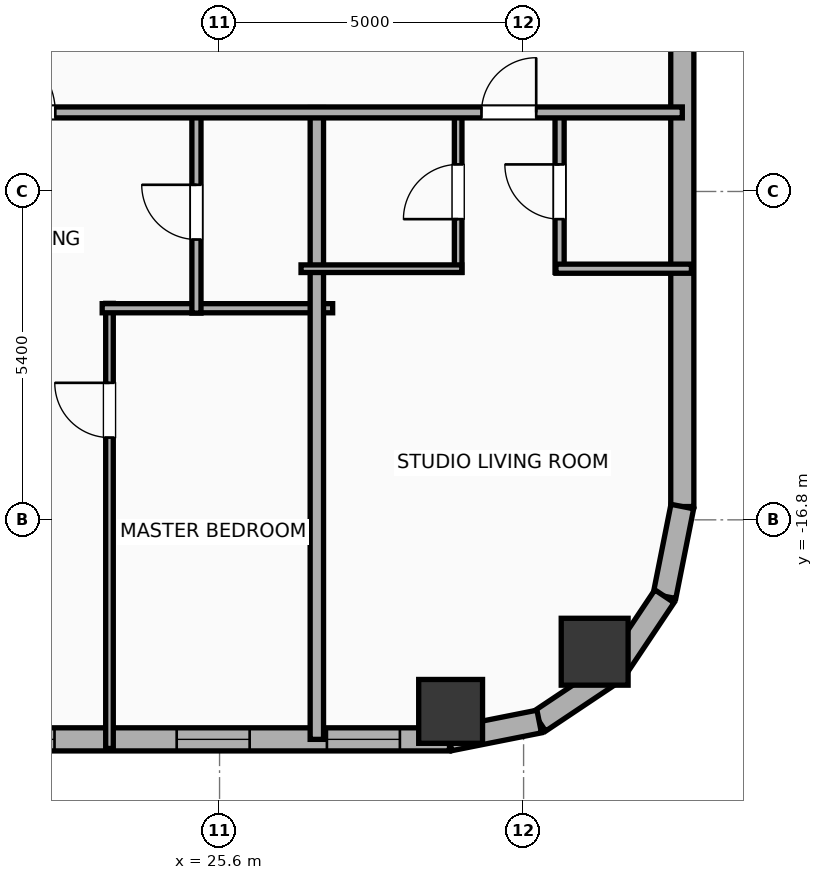
"""IFC4 building model, lengths in metres.
Left out: names, types, materials, properties, quantities, classifications, styles, units other than length and angle.
Written with IfcOpenShell. Run it as: python <this file> out.ifc"""

import sys

from ifc_helpers import new_model, si_unit, direction, frame, frame_2d, origin, origin_2d, place, context, subcontext, project, spatial, rectangle, hollow_rectangle, hollow_circle, extrude, element, fill, save


model = new_model("IFC4")
c1 = context("Model", 3, precision=1e-05, world=origin(), true_north=direction((0.0, 1.0)))
c2 = subcontext(c1, "Body", "Model", "MODEL_VIEW")
j1 = project(units=[si_unit("LENGTHUNIT", "METRE"), si_unit("PLANEANGLEUNIT", "RADIAN")], contexts=[c1])
p1 = place(None, origin())
s1 = spatial("IfcSite", under=j1, at=p1, CompositionType="ELEMENT")
p2 = place(p1, origin())
s2 = spatial("IfcBuilding", under=s1, at=p2, CompositionType="ELEMENT")
p3 = place(p2, frame((0.0, 0.0, 97.5)))
s3 = spatial("IfcBuildingStorey", under=s2, at=p3, CompositionType="ELEMENT", Elevation=97.5)
p4 = place(p3, frame((29.4, -19.95, 0.0), z_axis=(0.0, 0.0, 1.0), x_axis=(1.0, 0.0, 0.0)))
e1 = element("IfcColumn", 1, at=p4, inside=s3, PredefinedType="COLUMN", context=c2, shape_type="SweptSolid", body=[
    extrude(hollow_rectangle(XDim=1.05, YDim=1.05, WallThickness=0.036, at=origin_2d()), origin(), (0.0, 0.0, 1.0), 3.9),
])
p5 = place(p3, frame((31.769, -18.969, 0.0), z_axis=(0.0, 0.0, 1.0), x_axis=(1.0, 0.0, 0.0)))
e2 = element("IfcColumn", 2, at=p5, inside=s3, PredefinedType="COLUMN", context=c2, shape_type="SweptSolid", body=[
    extrude(hollow_circle(Radius=0.55, WallThickness=0.036, at=origin_2d()), origin(), (0.0, 0.0, 1.0), 3.9),
])
p6 = place(p3, frame((29.381, -20.41, 0.0), z_axis=(0.0, 0.0, 1.0), x_axis=(-1.0, 0.0, 0.0)))
e3 = element("IfcWall", 3, at=p6, inside=s3, PredefinedType="ELEMENTEDWALL", context=c2, shape_type="SweptSolid", body=[
    extrude(rectangle(XDim=54.763, YDim=0.38, at=frame_2d((27.381, 0.0))), origin(), (0.0, 0.0, 1.0), 3.65),
])
p7 = place(p6, frame((6.495, 0.0, 0.75)))
e4 = element("IfcOpeningElement", 4, at=p7, cuts=e3, PredefinedType="OPENING", context=c2, shape_type="SweptSolid", body=[
    extrude(rectangle(XDim=2.4, YDim=2.1, at=frame_2d((1.2, 1.05))), frame((0.0, 0.2, 0.0), z_axis=(0.0, -1.0, 0.0), x_axis=(1.0, 0.0, 0.0)), (0.0, 0.0, 1.0), 0.4),
])
p8 = place(p6, frame((17.686, 0.0, 0.75)))
e5 = element("IfcOpeningElement", 5, at=p8, cuts=e3, PredefinedType="OPENING", context=c2, shape_type="SweptSolid", body=[
    extrude(rectangle(XDim=2.4, YDim=2.1, at=frame_2d((1.2, 1.05))), frame((0.0, 0.2, 0.0), z_axis=(0.0, -1.0, 0.0), x_axis=(1.0, 0.0, 0.0)), (0.0, 0.0, 1.0), 0.4),
])
p9 = place(p6, frame((34.677, 0.0, 0.75)))
e6 = element("IfcOpeningElement", 6, at=p9, cuts=e3, PredefinedType="OPENING", context=c2, shape_type="SweptSolid", body=[
    extrude(rectangle(XDim=2.4, YDim=2.1, at=frame_2d((1.2, 1.05))), frame((0.0, 0.2, 0.0), z_axis=(0.0, -1.0, 0.0), x_axis=(1.0, 0.0, 0.0)), (0.0, 0.0, 1.0), 0.4),
])
p10 = place(p6, frame((45.867, 0.0, 0.75)))
e7 = element("IfcOpeningElement", 7, at=p10, cuts=e3, PredefinedType="OPENING", context=c2, shape_type="SweptSolid", body=[
    extrude(rectangle(XDim=2.4, YDim=2.1, at=frame_2d((1.2, 1.05))), frame((0.0, 0.2, 0.0), z_axis=(0.0, -1.0, 0.0), x_axis=(1.0, 0.0, 0.0)), (0.0, 0.0, 1.0), 0.4),
])
p11 = place(p6, frame((52.281, 0.0, 0.75)))
e8 = element("IfcOpeningElement", 8, at=p11, cuts=e3, PredefinedType="OPENING", context=c2, shape_type="SweptSolid", body=[
    extrude(rectangle(XDim=1.2, YDim=2.05, at=frame_2d((0.6, 1.025))), frame((0.0, 0.2, 0.0), z_axis=(0.0, -1.0, 0.0), x_axis=(1.0, 0.0, 0.0)), (0.0, 0.0, 1.0), 0.4),
])
p12 = place(p6, frame((49.641, 0.0, 0.75)))
e9 = element("IfcOpeningElement", 9, at=p12, cuts=e3, PredefinedType="OPENING", context=c2, shape_type="SweptSolid", body=[
    extrude(rectangle(XDim=1.2, YDim=2.05, at=frame_2d((0.6, 1.025))), frame((0.0, 0.2, 0.0), z_axis=(0.0, -1.0, 0.0), x_axis=(1.0, 0.0, 0.0)), (0.0, 0.0, 1.0), 0.4),
])
p13 = place(p6, frame((39.543, 0.0, 0.75)))
e10 = element("IfcOpeningElement", 10, at=p13, cuts=e3, PredefinedType="OPENING", context=c2, shape_type="SweptSolid", body=[
    extrude(rectangle(XDim=1.2, YDim=2.05, at=frame_2d((0.6, 1.025))), frame((0.0, 0.2, 0.0), z_axis=(0.0, -1.0, 0.0), x_axis=(1.0, 0.0, 0.0)), (0.0, 0.0, 1.0), 0.4),
])
p14 = place(p6, frame((44.538, 0.0, 0.75)))
e11 = element("IfcOpeningElement", 11, at=p14, cuts=e3, PredefinedType="OPENING", context=c2, shape_type="SweptSolid", body=[
    extrude(rectangle(XDim=0.52, YDim=2.05, at=frame_2d((0.26, 1.025))), frame((0.0, 0.2, 0.0), z_axis=(0.0, -1.0, 0.0), x_axis=(1.0, 0.0, 0.0)), (0.0, 0.0, 1.0), 0.4),
])
p15 = place(p6, frame((28.206, 0.0, 0.75)))
e12 = element("IfcOpeningElement", 12, at=p15, cuts=e3, PredefinedType="OPENING", context=c2, shape_type="SweptSolid", body=[
    extrude(rectangle(XDim=1.2, YDim=2.05, at=frame_2d((0.6, 1.025))), frame((0.0, 0.2, 0.0), z_axis=(0.0, -1.0, 0.0), x_axis=(1.0, 0.0, 0.0)), (0.0, 0.0, 1.0), 0.4),
])
p16 = place(p6, frame((31.241, 0.0, 0.75)))
e13 = element("IfcOpeningElement", 13, at=p16, cuts=e3, PredefinedType="OPENING", context=c2, shape_type="SweptSolid", body=[
    extrude(rectangle(XDim=0.85, YDim=2.05, at=frame_2d((0.425, 1.025))), frame((0.0, 0.2, 0.0), z_axis=(0.0, -1.0, 0.0), x_axis=(1.0, 0.0, 0.0)), (0.0, 0.0, 1.0), 0.4),
])
p17 = place(p6, frame((24.561, 0.0, 0.75)))
e14 = element("IfcOpeningElement", 14, at=p17, cuts=e3, PredefinedType="OPENING", context=c2, shape_type="SweptSolid", body=[
    extrude(rectangle(XDim=1.2, YDim=2.05, at=frame_2d((0.6, 1.025))), frame((0.0, 0.2, 0.0), z_axis=(0.0, -1.0, 0.0), x_axis=(1.0, 0.0, 0.0)), (0.0, 0.0, 1.0), 0.4),
])
p18 = place(p6, frame((22.561, 0.0, 0.75)))
e15 = element("IfcOpeningElement", 15, at=p18, cuts=e3, PredefinedType="OPENING", context=c2, shape_type="SweptSolid", body=[
    extrude(rectangle(XDim=0.52, YDim=2.05, at=frame_2d((0.26, 1.025))), frame((0.0, 0.2, 0.0), z_axis=(0.0, -1.0, 0.0), x_axis=(1.0, 0.0, 0.0)), (0.0, 0.0, 1.0), 0.4),
])
p19 = place(p6, frame((13.886, 0.0, 0.75)))
e16 = element("IfcOpeningElement", 16, at=p19, cuts=e3, PredefinedType="OPENING", context=c2, shape_type="SweptSolid", body=[
    extrude(rectangle(XDim=1.2, YDim=2.05, at=frame_2d((0.6, 1.025))), frame((0.0, 0.2, 0.0), z_axis=(0.0, -1.0, 0.0), x_axis=(1.0, 0.0, 0.0)), (0.0, 0.0, 1.0), 0.4),
])
p20 = place(p6, frame((11.694, 0.0, 0.75)))
e17 = element("IfcOpeningElement", 17, at=p20, cuts=e3, PredefinedType="OPENING", context=c2, shape_type="SweptSolid", body=[
    extrude(rectangle(XDim=0.85, YDim=2.05, at=frame_2d((0.425, 1.025))), frame((0.0, 0.2, 0.0), z_axis=(0.0, -1.0, 0.0), x_axis=(1.0, 0.0, 0.0)), (0.0, 0.0, 1.0), 0.4),
])
p21 = place(p6, frame((3.286, 0.0, 0.75)))
e18 = element("IfcOpeningElement", 18, at=p21, cuts=e3, PredefinedType="OPENING", context=c2, shape_type="SweptSolid", body=[
    extrude(rectangle(XDim=1.2, YDim=2.05, at=frame_2d((0.6, 1.025))), frame((0.0, 0.2, 0.0), z_axis=(0.0, -1.0, 0.0), x_axis=(1.0, 0.0, 0.0)), (0.0, 0.0, 1.0), 0.4),
])
p22 = place(p6, frame((0.816, 0.0, 0.75)))
e19 = element("IfcOpeningElement", 19, at=p22, cuts=e3, PredefinedType="OPENING", context=c2, shape_type="SweptSolid", body=[
    extrude(rectangle(XDim=1.2, YDim=2.05, at=frame_2d((0.6, 1.025))), frame((0.0, 0.2, 0.0), z_axis=(0.0, -1.0, 0.0), x_axis=(1.0, 0.0, 0.0)), (0.0, 0.0, 1.0), 0.4),
])
p23 = place(p3, frame((33.21, 17.781, 0.0), z_axis=(0.0, 0.0, 1.0), x_axis=(0.0, -1.0, 0.0)))
e20 = element("IfcWall", 20, at=p23, inside=s3, PredefinedType="ELEMENTEDWALL", context=c2, shape_type="SweptSolid", body=[
    extrude(rectangle(XDim=34.363, YDim=0.38, at=frame_2d((17.181, 0.0))), origin(), (0.0, 0.0, 1.0), 3.65),
])
p24 = place(p23, frame((12.836, 0.0, 0.75)))
e21 = element("IfcOpeningElement", 21, at=p24, cuts=e20, PredefinedType="OPENING", context=c2, shape_type="SweptSolid", body=[
    extrude(rectangle(XDim=1.2, YDim=2.05, at=frame_2d((0.6, 1.025))), frame((0.0, 0.2, 0.0), z_axis=(0.0, -1.0, 0.0), x_axis=(1.0, 0.0, 0.0)), (0.0, 0.0, 1.0), 0.4),
])
p25 = place(p23, frame((21.386, 0.0, 0.75)))
e22 = element("IfcOpeningElement", 22, at=p25, cuts=e20, PredefinedType="OPENING", context=c2, shape_type="SweptSolid", body=[
    extrude(rectangle(XDim=1.2, YDim=2.05, at=frame_2d((0.6, 1.025))), frame((0.0, 0.2, 0.0), z_axis=(0.0, -1.0, 0.0), x_axis=(1.0, 0.0, 0.0)), (0.0, 0.0, 1.0), 0.4),
])
p26 = place(p3, frame((33.21, -16.581, 0.0), z_axis=(0.0, 0.0, 1.0), x_axis=(-0.195086038585, -0.980786132421, 0.0)))
e23 = element("IfcWall", 23, at=p26, inside=s3, PredefinedType="ELEMENTEDWALL", context=c2, shape_type="SweptSolid", body=[
    extrude(rectangle(XDim=1.504, YDim=0.38, at=frame_2d((0.752, 0.0))), origin(), (0.0, 0.0, 1.0), 3.65),
])
p27 = place(p3, frame((32.917, -18.057, 0.0), z_axis=(0.0, 0.0, 1.0), x_axis=(-0.555610286119, -0.831442848281, 0.0)))
e24 = element("IfcWall", 24, at=p27, inside=s3, PredefinedType="ELEMENTEDWALL", context=c2, shape_type="SweptSolid", body=[
    extrude(rectangle(XDim=1.485, YDim=0.38, at=frame_2d((0.743, 0.0))), origin(), (0.0, 0.0, 1.0), 3.65),
])
p28 = place(p3, frame((32.091, -19.292, 0.0), z_axis=(0.0, 0.0, 1.0), x_axis=(-0.831468045563, -0.555572577804, 0.0)))
e25 = element("IfcWall", 25, at=p28, inside=s3, PredefinedType="ELEMENTEDWALL", context=c2, shape_type="SweptSolid", body=[
    extrude(rectangle(XDim=1.485, YDim=0.38, at=frame_2d((0.742, 0.0))), origin(), (0.0, 0.0, 1.0), 3.65),
])
p29 = place(p3, frame((30.857, -20.116, 0.0), z_axis=(0.0, 0.0, 1.0), x_axis=(-0.980786132421, -0.195086038585, 0.0)))
e26 = element("IfcWall", 26, at=p29, inside=s3, PredefinedType="ELEMENTEDWALL", context=c2, shape_type="SweptSolid", body=[
    extrude(rectangle(XDim=1.504, YDim=0.38, at=frame_2d((0.752, 0.0))), origin(), (0.0, 0.0, 1.0), 3.65),
])
p30 = place(p3, frame((23.79, -20.56, 0.0), z_axis=(0.0, 0.0, 1.0), x_axis=(0.0, 1.0, 0.0)))
e27 = element("IfcWall", 27, at=p30, inside=s3, PredefinedType="PARTITIONING", context=c2, shape_type="SweptSolid", body=[
    extrude(rectangle(XDim=7.32, YDim=0.125, at=frame_2d((3.66, 0.0))), origin(), (0.0, 0.0, 1.0), 3.65),
])
p31 = place(p30, frame((5.113, 0.0, 0.0)))
e28 = element("IfcOpeningElement", 28, at=p31, cuts=e27, PredefinedType="OPENING", context=c2, shape_type="SweptSolid", body=[
    extrude(rectangle(XDim=0.9, YDim=2.05, at=frame_2d((0.45, 1.025))), frame((0.0, 0.073, 0.0), z_axis=(0.0, -1.0, 0.0), x_axis=(1.0, 0.0, 0.0)), (0.0, 0.0, 1.0), 0.145),
])
p32 = place(p3, frame((23.67, -13.32, 0.0), z_axis=(0.0, 0.0, 1.0), x_axis=(1.0, 0.0, 0.0)))
e29 = element("IfcWall", 29, at=p32, inside=s3, PredefinedType="PLUMBINGWALL", context=c2, shape_type="SweptSolid", body=[
    extrude(rectangle(XDim=3.79, YDim=0.15, at=frame_2d((1.895, 0.0))), origin(), (0.0, 0.0, 1.0), 3.65),
])
p33 = place(p3, frame((25.22, -13.4, 0.0), z_axis=(0.0, 0.0, 1.0), x_axis=(0.0, 1.0, 0.0)))
e30 = element("IfcWall", 30, at=p33, inside=s3, PredefinedType="PLUMBINGWALL", context=c2, shape_type="SweptSolid", body=[
    extrude(rectangle(XDim=3.32, YDim=0.15, at=frame_2d((1.66, 0.0))), origin(), (0.0, 0.0, 1.0), 3.65),
])
p34 = place(p33, frame((1.21, 0.0, 0.0)))
e31 = element("IfcOpeningElement", 31, at=p34, cuts=e30, PredefinedType="OPENING", context=c2, shape_type="SweptSolid", body=[
    extrude(rectangle(XDim=0.9, YDim=2.05, at=frame_2d((0.45, 1.025))), frame((0.0, 0.085, 0.0), z_axis=(0.0, -1.0, 0.0), x_axis=(1.0, 0.0, 0.0)), (0.0, 0.0, 1.0), 0.17),
])
p35 = place(p3, frame((27.2, -20.41, 0.0), z_axis=(0.0, 0.0, 1.0), x_axis=(0.0, 1.0, 0.0)))
e32 = element("IfcWall", 32, at=p35, inside=s3, PredefinedType="PARTITIONING", context=c2, shape_type="SweptSolid", body=[
    extrude(rectangle(XDim=10.39, YDim=0.22, at=frame_2d((5.195, 0.0))), origin(), (0.0, 0.0, 1.0), 3.65),
])
p36 = place(p3, frame((29.524, -12.73, 0.0), z_axis=(0.0, 0.0, 1.0), x_axis=(0.0, 1.0, 0.0)))
e33 = element("IfcWall", 33, at=p36, inside=s3, PredefinedType="PARTITIONING", context=c2, shape_type="SweptSolid", body=[
    extrude(rectangle(XDim=2.65, YDim=0.125, at=frame_2d((1.325, 0.0))), origin(), (0.0, 0.0, 1.0), 3.65),
])
p37 = place(p36, frame((0.875, 0.0, 0.0)))
e34 = element("IfcOpeningElement", 34, at=p37, cuts=e33, PredefinedType="OPENING", context=c2, shape_type="SweptSolid", body=[
    extrude(rectangle(XDim=0.9, YDim=2.05, at=frame_2d((0.45, 1.025))), frame((0.0, 0.073, 0.0), z_axis=(0.0, -1.0, 0.0), x_axis=(1.0, 0.0, 0.0)), (0.0, 0.0, 1.0), 0.145),
])
p38 = place(p3, frame((31.192, -12.73, 0.0), z_axis=(0.0, 0.0, 1.0), x_axis=(0.0, 1.0, 0.0)))
e35 = element("IfcWall", 35, at=p38, inside=s3, PredefinedType="PLUMBINGWALL", context=c2, shape_type="SweptSolid", body=[
    extrude(rectangle(XDim=2.65, YDim=0.15, at=frame_2d((1.325, 0.0))), origin(), (0.0, 0.0, 1.0), 3.65),
])
p39 = place(p38, frame((0.875, 0.0, 0.0)))
e36 = element("IfcOpeningElement", 36, at=p39, cuts=e35, PredefinedType="OPENING", context=c2, shape_type="SweptSolid", body=[
    extrude(rectangle(XDim=0.9, YDim=2.05, at=frame_2d((0.45, 1.025))), frame((0.0, 0.085, 0.0), z_axis=(0.0, -1.0, 0.0), x_axis=(1.0, 0.0, 0.0)), (0.0, 0.0, 1.0), 0.17),
])
p40 = place(p3, frame((26.94, -12.67, 0.0), z_axis=(0.0, 0.0, 1.0), x_axis=(1.0, 0.0, 0.0)))
e37 = element("IfcWall", 37, at=p40, inside=s3, PredefinedType="PARTITIONING", context=c2, shape_type="SweptSolid", body=[
    extrude(rectangle(XDim=2.644, YDim=0.125, at=frame_2d((1.322, 0.0))), origin(), (0.0, 0.0, 1.0), 3.65),
])
p41 = place(p3, frame((31.132, -12.67, 0.0), z_axis=(0.0, 0.0, 1.0), x_axis=(1.0, 0.0, 0.0)))
e38 = element("IfcWall", 38, at=p41, inside=s3, PredefinedType="PLUMBINGWALL", context=c2, shape_type="SweptSolid", body=[
    extrude(rectangle(XDim=2.228, YDim=0.15, at=frame_2d((1.114, 0.0))), origin(), (0.0, 0.0, 1.0), 3.65),
])
p42 = place(p3, frame((-29.21, -10.1, 0.0), z_axis=(0.0, 0.0, 1.0), x_axis=(1.0, 0.0, 0.0)))
e39 = element("IfcWall", 39, at=p42, inside=s3, PredefinedType="PARTITIONING", context=c2, shape_type="SweptSolid", body=[
    extrude(rectangle(XDim=62.42, YDim=0.18, at=frame_2d((31.21, 0.0))), origin(), (0.0, 0.0, 1.0), 3.65),
])
p43 = place(p42, frame((3.033, 0.0, 0.0)))
e40 = element("IfcOpeningElement", 40, at=p43, cuts=e39, PredefinedType="OPENING", context=c2, shape_type="SweptSolid", body=[
    extrude(rectangle(XDim=0.9, YDim=2.05, at=frame_2d((0.45, 1.025))), frame((0.0, 0.1, 0.0), z_axis=(0.0, -1.0, 0.0), x_axis=(1.0, 0.0, 0.0)), (0.0, 0.0, 1.0), 0.2),
])
p44 = place(p42, frame((9.768, 0.0, 0.0)))
e41 = element("IfcOpeningElement", 41, at=p44, cuts=e39, PredefinedType="OPENING", context=c2, shape_type="SweptSolid", body=[
    extrude(rectangle(XDim=0.9, YDim=2.05, at=frame_2d((0.45, 1.025))), frame((0.0, 0.1, 0.0), z_axis=(0.0, -1.0, 0.0), x_axis=(1.0, 0.0, 0.0)), (0.0, 0.0, 1.0), 0.2),
])
p45 = place(p42, frame((18.65, 0.0, 0.0)))
e42 = element("IfcOpeningElement", 42, at=p45, cuts=e39, PredefinedType="OPENING", context=c2, shape_type="SweptSolid", body=[
    extrude(rectangle(XDim=1.15, YDim=2.05, at=frame_2d((0.575, 1.025))), frame((0.0, 0.1, 0.0), z_axis=(0.0, -1.0, 0.0), x_axis=(1.0, 0.0, 0.0)), (0.0, 0.0, 1.0), 0.2),
])
p46 = place(p42, frame((29.212, 0.0, 0.0)))
e43 = element("IfcOpeningElement", 43, at=p46, cuts=e39, PredefinedType="OPENING", context=c2, shape_type="SweptSolid", body=[
    extrude(rectangle(XDim=1.15, YDim=2.05, at=frame_2d((0.575, 1.025))), frame((0.0, 0.1, 0.0), z_axis=(0.0, -1.0, 0.0), x_axis=(1.0, 0.0, 0.0)), (0.0, 0.0, 1.0), 0.2),
])
p47 = place(p42, frame((40.379, 0.0, 0.0)))
e44 = element("IfcOpeningElement", 44, at=p47, cuts=e39, PredefinedType="OPENING", context=c2, shape_type="SweptSolid", body=[
    extrude(rectangle(XDim=1.15, YDim=2.05, at=frame_2d((0.575, 1.025))), frame((0.0, 0.1, 0.0), z_axis=(0.0, -1.0, 0.0), x_axis=(1.0, 0.0, 0.0)), (0.0, 0.0, 1.0), 0.2),
])
p48 = place(p42, frame((50.959, 0.0, 0.0)))
e45 = element("IfcOpeningElement", 45, at=p48, cuts=e39, PredefinedType="OPENING", context=c2, shape_type="SweptSolid", body=[
    extrude(rectangle(XDim=1.15, YDim=2.05, at=frame_2d((0.575, 1.025))), frame((0.0, 0.1, 0.0), z_axis=(0.0, -1.0, 0.0), x_axis=(1.0, 0.0, 0.0)), (0.0, 0.0, 1.0), 0.2),
])
p49 = place(p42, frame((59.117, 0.0, 0.0)))
e46 = element("IfcOpeningElement", 46, at=p49, cuts=e39, PredefinedType="OPENING", context=c2, shape_type="SweptSolid", body=[
    extrude(rectangle(XDim=0.9, YDim=2.05, at=frame_2d((0.45, 1.025))), frame((0.0, 0.1, 0.0), z_axis=(0.0, -1.0, 0.0), x_axis=(1.0, 0.0, 0.0)), (0.0, 0.0, 1.0), 0.2),
])
p50 = place(p7, origin())
e47 = element("IfcWindow", 47, at=p50, inside=s3, PartitioningType="SINGLE_PANEL", PredefinedType="WINDOW", context=c2, shape_type="SweptSolid", body=[
    extrude(rectangle(XDim=2.4, YDim=2.1, at=frame_2d((1.2, 1.05))), frame((0.0, 0.03, 0.0), z_axis=(0.0, -1.0, 0.0), x_axis=(1.0, 0.0, 0.0)), (0.0, 0.0, 1.0), 0.06),
])
fill(e4, e47)
p51 = place(p21, origin())
e48 = element("IfcWindow", 48, at=p51, inside=s3, PartitioningType="SINGLE_PANEL", PredefinedType="WINDOW", context=c2, shape_type="SweptSolid", body=[
    extrude(rectangle(XDim=1.2, YDim=2.05, at=frame_2d((0.6, 1.025))), frame((0.0, 0.03, 0.0), z_axis=(0.0, -1.0, 0.0), x_axis=(1.0, 0.0, 0.0)), (0.0, 0.0, 1.0), 0.06),
])
fill(e18, e48)
p52 = place(p22, origin())
e49 = element("IfcWindow", 49, at=p52, inside=s3, PartitioningType="SINGLE_PANEL", PredefinedType="WINDOW", context=c2, shape_type="SweptSolid", body=[
    extrude(rectangle(XDim=1.2, YDim=2.05, at=frame_2d((0.6, 1.025))), frame((0.0, 0.03, 0.0), z_axis=(0.0, -1.0, 0.0), x_axis=(1.0, 0.0, 0.0)), (0.0, 0.0, 1.0), 0.06),
])
fill(e19, e49)
p53 = place(p31, origin())
e50 = element("IfcDoor", 50, at=p53, inside=s3, OperationType="SINGLE_SWING_RIGHT", PredefinedType="DOOR", context=c2, shape_type="SweptSolid", body=[
    extrude(rectangle(XDim=0.9, YDim=2.05, at=frame_2d((0.45, 1.025))), frame((0.0, 0.025, 0.0), z_axis=(0.0, -1.0, 0.0), x_axis=(1.0, 0.0, 0.0)), (0.0, 0.0, 1.0), 0.05),
])
fill(e28, e50)
p54 = place(p34, origin())
e51 = element("IfcDoor", 51, at=p54, inside=s3, OperationType="SINGLE_SWING_RIGHT", PredefinedType="DOOR", context=c2, shape_type="SweptSolid", body=[
    extrude(rectangle(XDim=0.9, YDim=2.05, at=frame_2d((0.45, 1.025))), frame((0.0, 0.025, 0.0), z_axis=(0.0, -1.0, 0.0), x_axis=(1.0, 0.0, 0.0)), (0.0, 0.0, 1.0), 0.05),
])
fill(e31, e51)
p55 = place(p37, origin())
e52 = element("IfcDoor", 52, at=p55, inside=s3, OperationType="SINGLE_SWING_LEFT", PredefinedType="DOOR", context=c2, shape_type="SweptSolid", body=[
    extrude(rectangle(XDim=0.9, YDim=2.05, at=frame_2d((0.45, 1.025))), frame((0.0, 0.025, 0.0), z_axis=(0.0, -1.0, 0.0), x_axis=(1.0, 0.0, 0.0)), (0.0, 0.0, 1.0), 0.05),
])
fill(e34, e52)
p56 = place(p39, origin())
e53 = element("IfcDoor", 53, at=p56, inside=s3, OperationType="SINGLE_SWING_RIGHT", PredefinedType="DOOR", context=c2, shape_type="SweptSolid", body=[
    extrude(rectangle(XDim=0.9, YDim=2.05, at=frame_2d((0.45, 1.025))), frame((0.0, 0.025, 0.0), z_axis=(0.0, -1.0, 0.0), x_axis=(1.0, 0.0, 0.0)), (0.0, 0.0, 1.0), 0.05),
])
fill(e36, e53)
p57 = place(p48, origin())
e54 = element("IfcDoor", 54, at=p57, inside=s3, OperationType="SINGLE_SWING_LEFT", PredefinedType="DOOR", context=c2, shape_type="SweptSolid", body=[
    extrude(rectangle(XDim=1.15, YDim=2.05, at=frame_2d((0.575, 1.025))), frame((0.0, 0.025, 0.0), z_axis=(0.0, -1.0, 0.0), x_axis=(1.0, 0.0, 0.0)), (0.0, 0.0, 1.0), 0.05),
])
fill(e45, e54)
p58 = place(p49, origin())
e55 = element("IfcDoor", 55, at=p58, inside=s3, OperationType="SINGLE_SWING_RIGHT", PredefinedType="DOOR", context=c2, shape_type="SweptSolid", body=[
    extrude(rectangle(XDim=0.9, YDim=2.05, at=frame_2d((0.45, 1.025))), frame((0.0, 0.025, 0.0), z_axis=(0.0, -1.0, 0.0), x_axis=(1.0, 0.0, 0.0)), (0.0, 0.0, 1.0), 0.05),
])
fill(e46, e55)
save(model, sys.argv[1])
